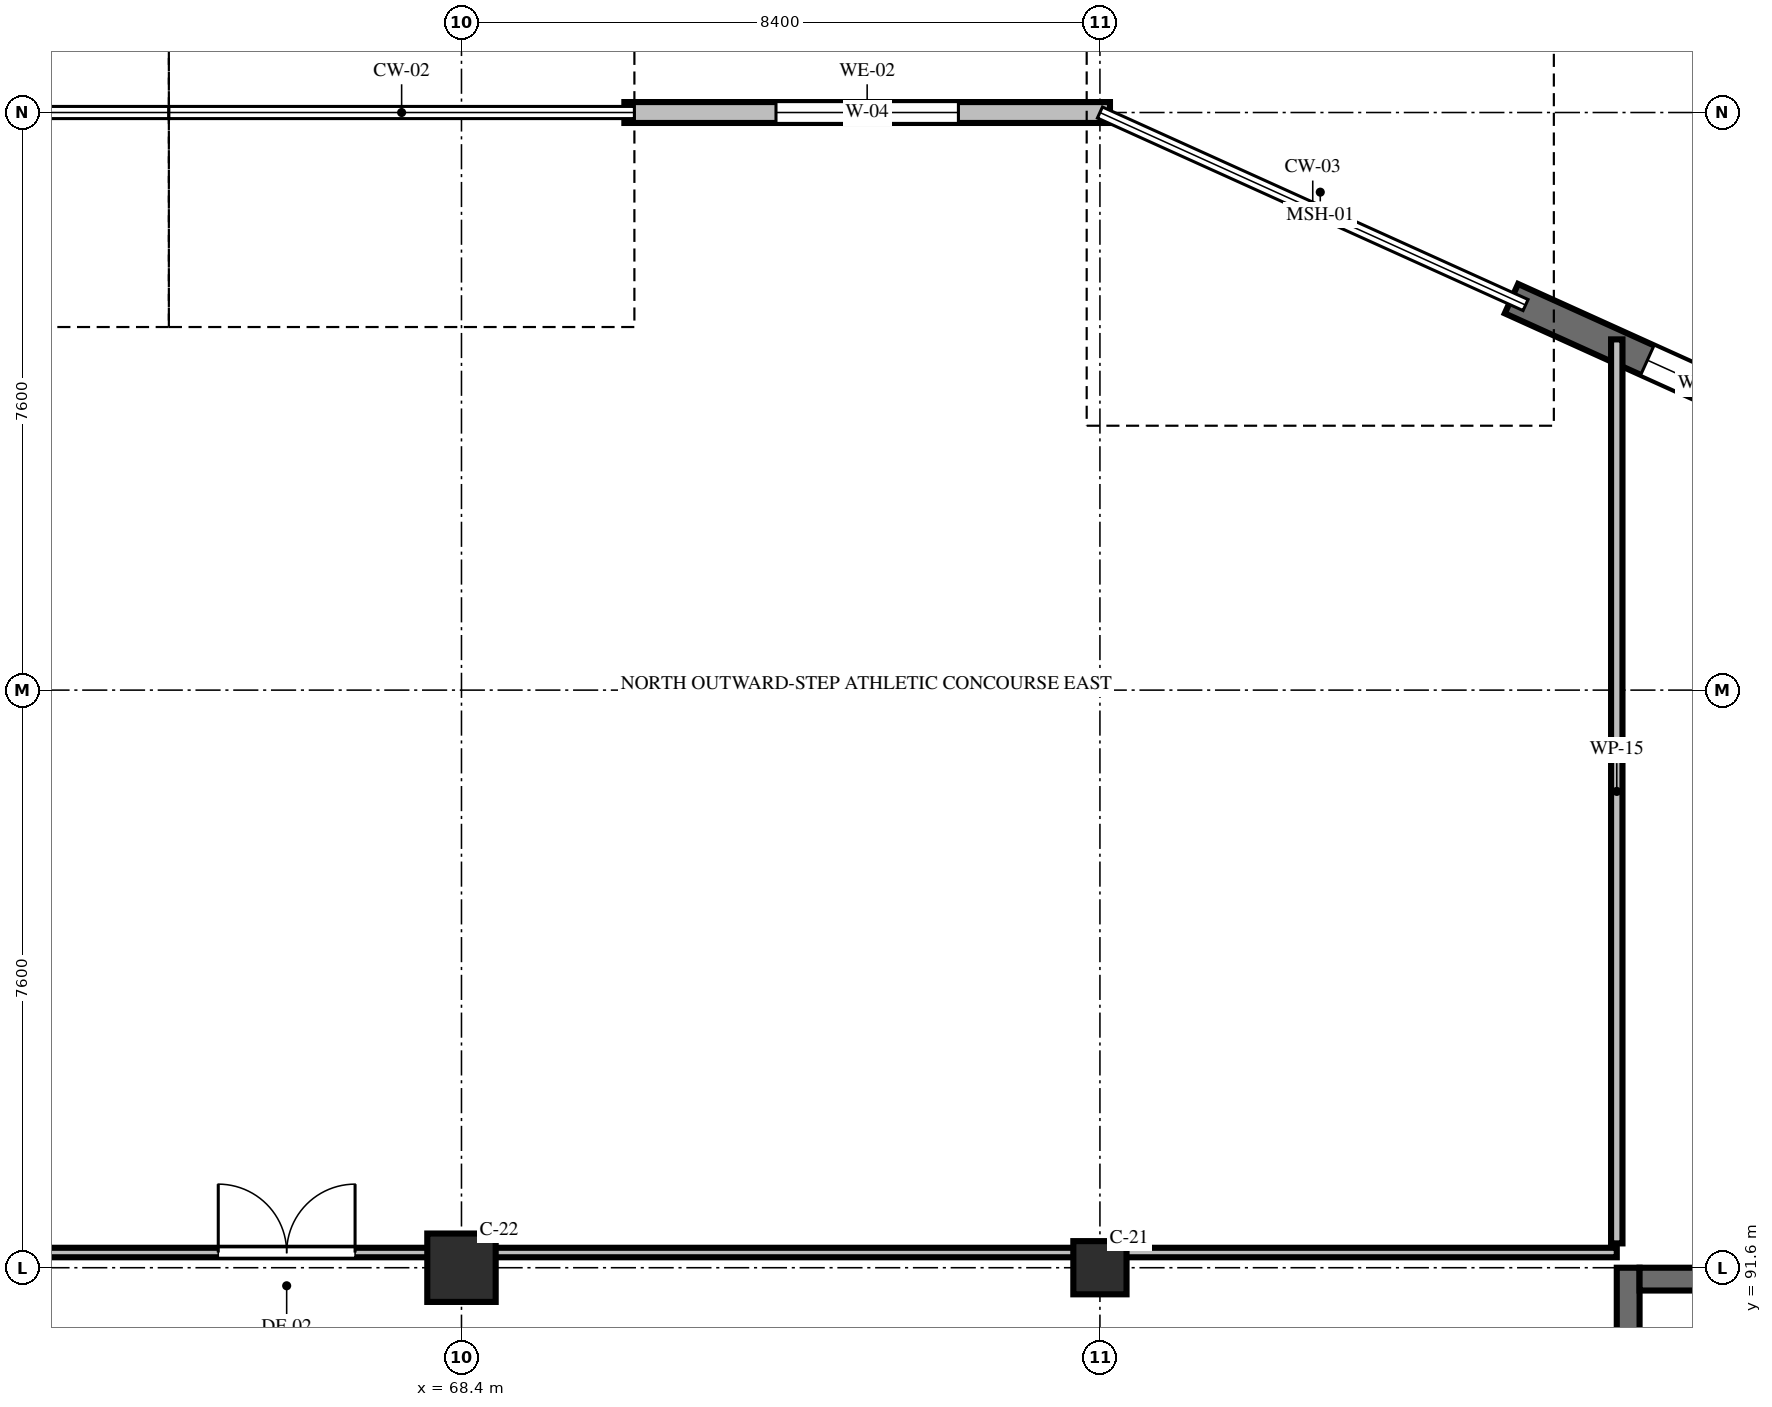
"""IFC4 building model, lengths in metres.
Left out: names, types, materials, properties, quantities, classifications, styles, units other than length and angle.
Written with IfcOpenShell. Run it as: python <this file> out.ifc"""

import sys

from ifc_helpers import new_model, si_unit, direction, frame, frame_2d, origin, origin_2d, place, context, subcontext, project, spatial, rectangle, hollow_rectangle, extrude, element, fill, save


model = new_model("IFC4")
c1 = context("Model", 3, precision=1e-05, world=origin(), true_north=direction((0.0, 1.0)))
c2 = subcontext(c1, "Body", "Model", "MODEL_VIEW")
j1 = project(units=[si_unit("LENGTHUNIT", "METRE"), si_unit("PLANEANGLEUNIT", "RADIAN")], contexts=[c1])
p1 = place(None, origin())
s1 = spatial("IfcSite", under=j1, at=p1, CompositionType="ELEMENT")
p2 = place(p1, origin())
s2 = spatial("IfcBuilding", under=s1, at=p2, CompositionType="ELEMENT")
p3 = place(p2, frame((0.0, 0.0, 10.8)))
s3 = spatial("IfcBuildingStorey", under=s2, at=p3, CompositionType="ELEMENT", Elevation=10.8)
p4 = place(p3, frame((68.4, 91.6, 0.0), z_axis=(0.0, 0.0, 1.0), x_axis=(1.0, 0.0, 0.0)))
e1 = element("IfcColumn", 1, at=p4, inside=s3, PredefinedType="COLUMN", context=c2, shape_type="SweptSolid", body=[
    extrude(hollow_rectangle(XDim=0.9, YDim=0.9, WallThickness=0.036, InnerFilletRadius=0.036, OuterFilletRadius=0.072, at=origin_2d()), origin(), (0.0, 0.0, 1.0), 6.0),
])
p5 = place(p3, frame((76.8, 91.6, 0.0), z_axis=(0.0, 0.0, 1.0), x_axis=(1.0, 0.0, 0.0)))
e2 = element("IfcColumn", 2, at=p5, inside=s3, PredefinedType="COLUMN", context=c2, shape_type="SweptSolid", body=[
    extrude(hollow_rectangle(XDim=0.7, YDim=0.7, WallThickness=0.028, InnerFilletRadius=0.028, OuterFilletRadius=0.056, at=origin_2d()), origin(), (0.0, 0.0, 1.0), 6.0),
])
p6 = place(p3, frame((82.214, 104.351, 0.0), z_axis=(0.0, 0.0, 1.0), x_axis=(0.911125240907, -0.412129585666, 0.0)))
e3 = element("IfcWall", 3, at=p6, inside=s3, PredefinedType="SOLIDWALL", context=c2, shape_type="SweptSolid", body=[
    extrude(rectangle(XDim=6.554, YDim=0.425, at=frame_2d((3.277, 0.0))), origin(), (0.0, 0.0, 1.0), 5.68),
])
p7 = place(p6, frame((1.963, 0.0, 0.9)))
e4 = element("IfcOpeningElement", 4, at=p7, cuts=e3, PredefinedType="OPENING", context=c2, shape_type="SweptSolid", body=[
    extrude(rectangle(XDim=1.5, YDim=1.5, at=frame_2d((0.75, 0.75))), frame((0.0, 0.222, 0.0), z_axis=(0.0, -1.0, 0.0), x_axis=(1.0, 0.0, 0.0)), (0.0, 0.0, 1.0), 0.445),
])
p8 = place(p3, frame((70.543, 106.8, 0.0), z_axis=(0.0, 0.0, 1.0), x_axis=(1.0, 0.0, 0.0)))
e5 = element("IfcWall", 5, at=p8, inside=s3, PredefinedType="SOLIDWALL", context=c2, shape_type="SweptSolid", body=[
    extrude(rectangle(XDim=6.389, YDim=0.275, at=frame_2d((3.194, 0.0))), origin(), (0.0, 0.0, 1.0), 5.08),
])
p9 = place(p8, frame((1.995, 0.0, 0.9)))
e6 = element("IfcOpeningElement", 6, at=p9, cuts=e5, PredefinedType="OPENING", context=c2, shape_type="SweptSolid", body=[
    extrude(rectangle(XDim=2.4, YDim=1.8, at=frame_2d((1.2, 0.9))), frame((0.0, 0.147, 0.0), z_axis=(0.0, -1.0, 0.0), x_axis=(1.0, 0.0, 0.0)), (0.0, 0.0, 1.0), 0.295),
])
p10 = place(p3, frame((83.75, 86.3, 0.0), z_axis=(0.0, 0.0, 1.0), x_axis=(0.0, 1.0, 0.0)))
e7 = element("IfcWall", 7, at=p10, inside=s3, PredefinedType="SHEAR", context=c2, shape_type="SweptSolid", body=[
    extrude(rectangle(XDim=5.3, YDim=0.3, at=frame_2d((2.65, 0.0))), origin(), (0.0, 0.0, 1.0), 5.68),
])
p11 = place(p3, frame((83.9, 91.45, 0.0), z_axis=(0.0, 0.0, 1.0), x_axis=(1.0, 0.0, 0.0)))
e8 = element("IfcWall", 8, at=p11, inside=s3, PredefinedType="SHEAR", context=c2, shape_type="SweptSolid", body=[
    extrude(rectangle(XDim=9.4, YDim=0.3, at=frame_2d((4.7, 0.0))), origin(), (0.0, 0.0, 1.0), 5.68),
])
p12 = place(p3, frame((48.6, 91.8, 0.0), z_axis=(0.0, 0.0, 1.0), x_axis=(1.0, 0.0, 0.0)))
e9 = element("IfcWall", 9, at=p12, inside=s3, PredefinedType="PARTITIONING", context=c2, shape_type="SweptSolid", body=[
    extrude(rectangle(XDim=35.0, YDim=0.125, at=frame_2d((17.5, 0.0))), origin(), (0.0, 0.0, 1.0), 4.8),
])
p13 = place(p12, frame((16.6, 0.0, 0.0)))
e10 = element("IfcOpeningElement", 10, at=p13, cuts=e9, PredefinedType="OPENING", context=c2, shape_type="SweptSolid", body=[
    extrude(rectangle(XDim=1.8, YDim=2.2, at=frame_2d((0.9, 1.1))), frame((0.0, 0.073, 0.0), z_axis=(0.0, -1.0, 0.0), x_axis=(1.0, 0.0, 0.0)), (0.0, 0.0, 1.0), 0.145),
])
p14 = place(p3, frame((83.6, 103.815, 0.0), z_axis=(0.0, 0.0, 1.0), x_axis=(0.0, -1.0, 0.0)))
e11 = element("IfcWall", 11, at=p14, inside=s3, PredefinedType="PARTITIONING", context=c2, shape_type="SweptSolid", body=[
    extrude(rectangle(XDim=11.895, YDim=0.15, at=frame_2d((5.948, 0.0))), origin(), (0.0, 0.0, 1.0), 5.65),
])
p15 = place(p7, origin())
e12 = element("IfcWindow", 12, at=p15, inside=s3, PartitioningType="DOUBLE_PANEL_VERTICAL", PredefinedType="WINDOW", context=c2, shape_type="SweptSolid", body=[
    extrude(rectangle(XDim=1.5, YDim=1.5, at=frame_2d((0.75, 0.75))), frame((0.0, 0.03, 0.0), z_axis=(0.0, -1.0, 0.0), x_axis=(1.0, 0.0, 0.0)), (0.0, 0.0, 1.0), 0.06),
])
fill(e4, e12)
p16 = place(p9, origin())
e13 = element("IfcWindow", 13, at=p16, inside=s3, PartitioningType="DOUBLE_PANEL_VERTICAL", PredefinedType="WINDOW", context=c2, shape_type="SweptSolid", body=[
    extrude(rectangle(XDim=2.4, YDim=1.8, at=frame_2d((1.2, 0.9))), frame((0.0, 0.03, 0.0), z_axis=(0.0, -1.0, 0.0), x_axis=(1.0, 0.0, 0.0)), (0.0, 0.0, 1.0), 0.06),
])
fill(e6, e13)
p17 = place(p13, origin())
e14 = element("IfcDoor", 14, at=p17, inside=s3, OperationType="DOUBLE_DOOR_SINGLE_SWING", PredefinedType="DOOR", context=c2, shape_type="SweptSolid", body=[
    extrude(rectangle(XDim=1.8, YDim=2.2, at=frame_2d((0.9, 1.1))), frame((0.0, 0.025, 0.0), z_axis=(0.0, -1.0, 0.0), x_axis=(1.0, 0.0, 0.0)), (0.0, 0.0, 1.0), 0.05),
])
fill(e10, e14)
save(model, sys.argv[1])
